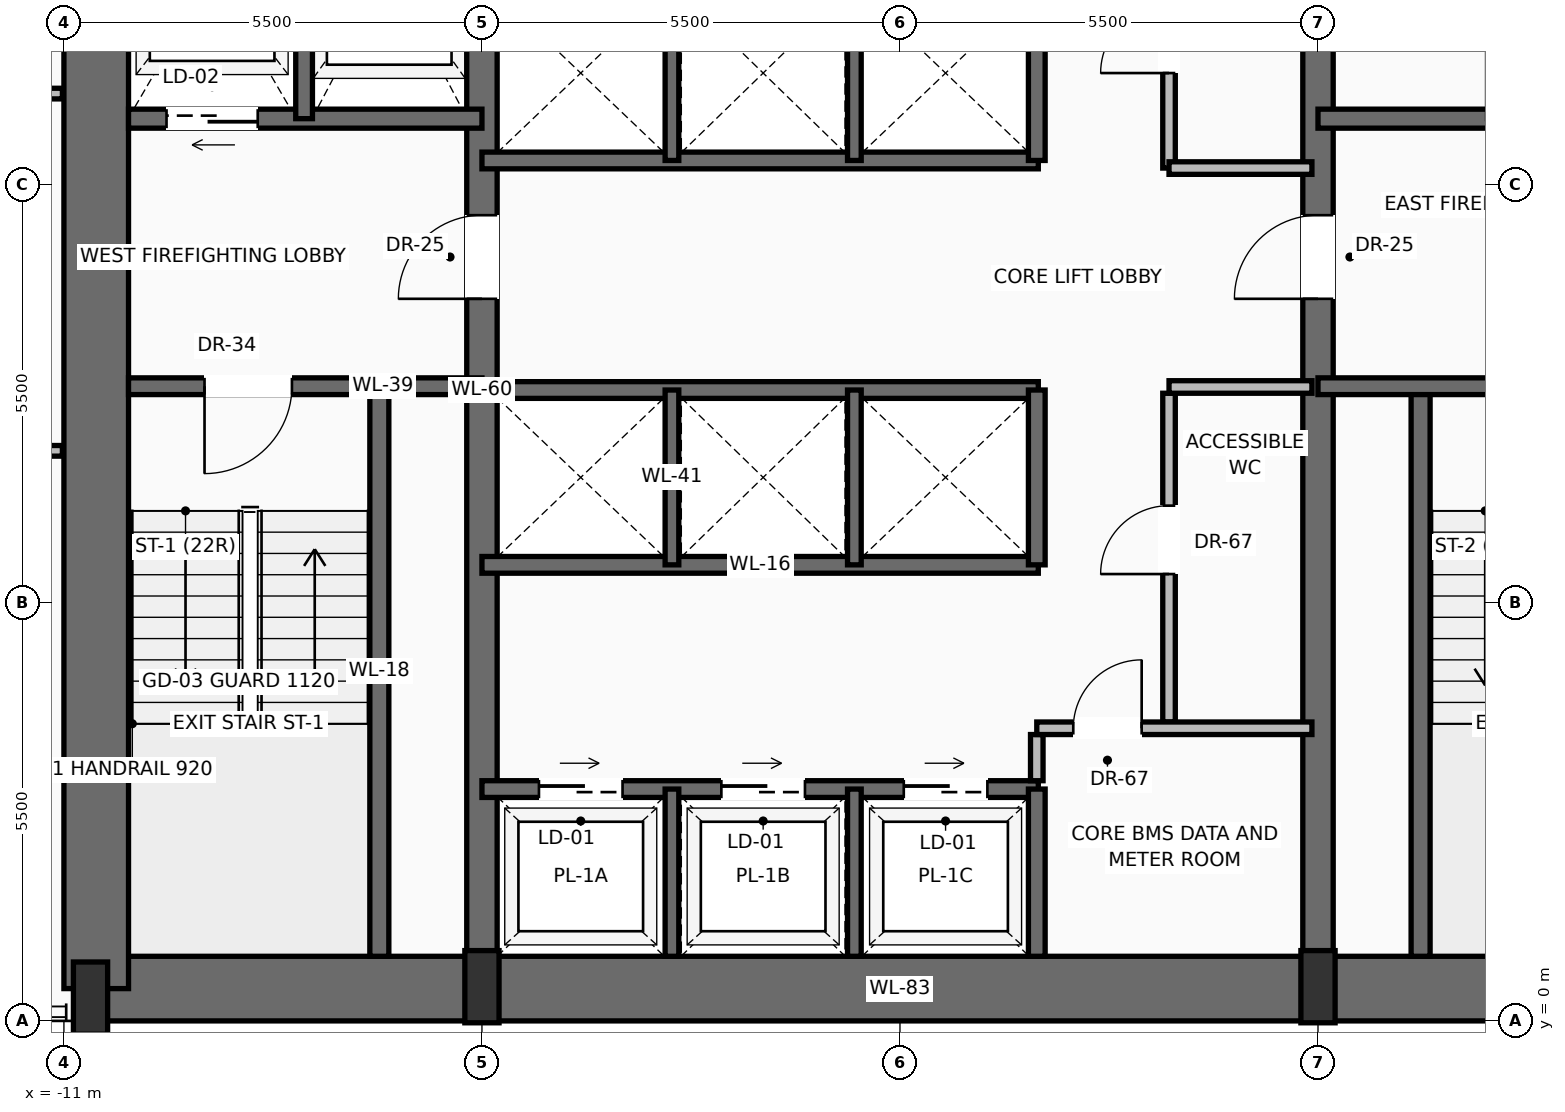
"""IFC4 building model, lengths in metres.
Left out: names, types, materials, properties, quantities, classifications, styles, units other than length and angle.
Written with IfcOpenShell. Run it as: python <this file> out.ifc"""

import sys

from ifc_helpers import new_model, si_unit, direction, frame, frame_2d, origin, origin_2d, place, context, subcontext, project, spatial, rectangle, extrude, source, transform, mapped, element, fill, save


model = new_model("IFC4")
c1 = context("Model", 3, precision=1e-05, world=origin(), true_north=direction((0.0, 1.0)))
c2 = subcontext(c1, "Body", "Model", "MODEL_VIEW")
j1 = project(units=[si_unit("LENGTHUNIT", "METRE"), si_unit("PLANEANGLEUNIT", "RADIAN")], contexts=[c1])
p1 = place(None, origin())
s1 = spatial("IfcSite", under=j1, at=p1, CompositionType="ELEMENT")
p2 = place(p1, origin())
s2 = spatial("IfcBuilding", under=s1, at=p2, CompositionType="ELEMENT")
p3 = place(p2, frame((0.0, 0.0, 42.3)))
s3 = spatial("IfcBuildingStorey", under=s2, at=p3, CompositionType="ELEMENT", Elevation=42.3)
p4 = place(p3, frame((-10.65, 0.425, 0.0), z_axis=(0.0, 0.0, 1.0), x_axis=(1.0, 0.0, 0.0)))
e1 = element("IfcWall", 1, at=p4, inside=s3, PredefinedType="SHEAR", context=c2, shape_type="SweptSolid", body=[
    extrude(rectangle(XDim=21.3, YDim=0.85, at=frame_2d((10.65, 0.0))), origin(), (0.0, 0.0, 1.0), 3.45),
])
p5 = place(p3, frame((-10.575, 0.425, 0.0), z_axis=(0.0, 0.0, 1.0), x_axis=(0.0, 1.0, 0.0)))
e2 = element("IfcWall", 2, at=p5, inside=s3, PredefinedType="SHEAR", context=c2, shape_type="SweptSolid", body=[
    extrude(rectangle(XDim=15.75, YDim=0.85, at=frame_2d((7.875, 0.0))), origin(), (0.0, 0.0, 1.0), 3.45),
])
p6 = place(p3, frame((-5.5, 0.425, 0.0), z_axis=(0.0, 0.0, 1.0), x_axis=(0.0, 1.0, 0.0)))
e3 = element("IfcWall", 3, at=p6, inside=s3, PredefinedType="SHEAR", context=c2, shape_type="SweptSolid", body=[
    extrude(rectangle(XDim=15.75, YDim=0.4, at=frame_2d((7.875, 0.0))), origin(), (0.0, 0.0, 1.0), 3.45),
])
p7 = place(p6, frame((9.075, 0.0, 0.0)))
e4 = element("IfcOpeningElement", 4, at=p7, cuts=e3, PredefinedType="OPENING", context=c2, shape_type="SweptSolid", body=[
    extrude(rectangle(XDim=1.1, YDim=2.2, at=frame_2d((0.55, 1.1))), frame((0.0, 0.21, 0.0), z_axis=(0.0, -1.0, 0.0), x_axis=(1.0, 0.0, 0.0)), (0.0, 0.0, 1.0), 0.42),
])
p8 = place(p3, frame((5.5, 0.425, 0.0), z_axis=(0.0, 0.0, 1.0), x_axis=(0.0, 1.0, 0.0)))
e5 = element("IfcWall", 5, at=p8, inside=s3, PredefinedType="SHEAR", context=c2, shape_type="SweptSolid", body=[
    extrude(rectangle(XDim=15.75, YDim=0.4, at=frame_2d((7.875, 0.0))), origin(), (0.0, 0.0, 1.0), 3.45),
])
p9 = place(p8, frame((9.075, 0.0, 0.0)))
e6 = element("IfcOpeningElement", 6, at=p9, cuts=e5, PredefinedType="OPENING", context=c2, shape_type="SweptSolid", body=[
    extrude(rectangle(XDim=1.1, YDim=2.2, at=frame_2d((0.55, 1.1))), frame((0.0, 0.21, 0.0), z_axis=(0.0, -1.0, 0.0), x_axis=(1.0, 0.0, 0.0)), (0.0, 0.0, 1.0), 0.42),
])
m1 = source(origin(), c2, "Body", "SweptSolid", [
    extrude(rectangle(XDim=0.45, YDim=0.95, at=origin_2d()), origin(), (0.0, 0.0, 1.0), 3.7),
])
for number, where, z_axis, x_axis in (
    (7, (-10.65, 0.3, 0.0), (0.0, 0.0, 1.0), (1.0, 0.0, 0.0)),
    (8, (-5.5, 0.45, 0.0), (0.0, 0.0, 1.0), (1.0, 0.0, 0.0)),
    (9, (5.5, 0.45, 0.0), (0.0, 0.0, 1.0), (1.0, 0.0, 0.0)),
):
    element("IfcColumn", number, at=place(p3, frame(where, z_axis=z_axis, x_axis=x_axis)), inside=s3, PredefinedType="PILASTER", context=c2, shape_type="MappedRepresentation", body=[
        mapped(m1, transform((0.0, 0.0, 0.0), scale=1.0)),
    ])
p10 = place(p3, frame((-6.85, 0.85, 0.0), z_axis=(0.0, 0.0, 1.0), x_axis=(0.0, 1.0, 0.0)))
e10 = element("IfcWall", 10, at=p10, inside=s3, PredefinedType="SOLIDWALL", context=c2, shape_type="SweptSolid", body=[
    extrude(rectangle(XDim=7.5, YDim=0.25, at=frame_2d((3.75, 0.0))), origin(), (0.0, 0.0, 1.0), 3.45),
])
p11 = place(p3, frame((-5.5, 8.35, 0.0), z_axis=(0.0, 0.0, 1.0), x_axis=(-1.0, 0.0, 0.0)))
e11 = element("IfcWall", 11, at=p11, inside=s3, PredefinedType="SOLIDWALL", context=c2, shape_type="SweptSolid", body=[
    extrude(rectangle(XDim=4.65, YDim=0.22, at=frame_2d((2.325, 0.0))), origin(), (0.0, 0.0, 1.0), 3.45),
])
p12 = place(p11, frame((2.5, 0.0, 0.0)))
e12 = element("IfcOpeningElement", 12, at=p12, cuts=e11, PredefinedType="OPENING", context=c2, shape_type="SweptSolid", body=[
    extrude(rectangle(XDim=1.15, YDim=2.2, at=frame_2d((0.575, 1.1))), frame((0.0, 0.12, 0.0), z_axis=(0.0, -1.0, 0.0), x_axis=(1.0, 0.0, 0.0)), (0.0, 0.0, 1.0), 0.24),
])
p13 = place(p3, frame((-5.5, 11.87, 0.0), z_axis=(0.0, 0.0, 1.0), x_axis=(-1.0, 0.0, 0.0)))
e13 = element("IfcWall", 13, at=p13, inside=s3, PredefinedType="SOLIDWALL", context=c2, shape_type="SweptSolid", body=[
    extrude(rectangle(XDim=4.65, YDim=0.25, at=frame_2d((2.325, 0.0))), origin(), (0.0, 0.0, 1.0), 3.45),
])
p14 = place(p13, frame((2.95, 0.0, 0.0)))
e14 = element("IfcOpeningElement", 14, at=p14, cuts=e13, PredefinedType="OPENING", context=c2, shape_type="SweptSolid", body=[
    extrude(rectangle(XDim=1.2, YDim=2.25, at=frame_2d((0.6, 1.125))), frame((0.0, 0.135, 0.0), z_axis=(0.0, -1.0, 0.0), x_axis=(1.0, 0.0, 0.0)), (0.0, 0.0, 1.0), 0.27),
])
p15 = place(p3, frame((-7.84, 11.87, 0.0), z_axis=(0.0, 0.0, 1.0), x_axis=(0.0, 1.0, 0.0)))
e15 = element("IfcWall", 15, at=p15, inside=s3, PredefinedType="SOLIDWALL", context=c2, shape_type="SweptSolid", body=[
    extrude(rectangle(XDim=3.88, YDim=0.22, at=frame_2d((1.94, 0.0))), origin(), (0.0, 0.0, 1.0), 3.45),
])
p16 = place(p3, frame((6.85, 0.85, 0.0), z_axis=(0.0, 0.0, 1.0), x_axis=(0.0, 1.0, 0.0)))
e16 = element("IfcWall", 16, at=p16, inside=s3, PredefinedType="SOLIDWALL", context=c2, shape_type="SweptSolid", body=[
    extrude(rectangle(XDim=7.5, YDim=0.25, at=frame_2d((3.75, 0.0))), origin(), (0.0, 0.0, 1.0), 3.45),
])
p17 = place(p3, frame((10.15, 8.35, 0.0), z_axis=(0.0, 0.0, 1.0), x_axis=(-1.0, 0.0, 0.0)))
e17 = element("IfcWall", 17, at=p17, inside=s3, PredefinedType="SOLIDWALL", context=c2, shape_type="SweptSolid", body=[
    extrude(rectangle(XDim=4.65, YDim=0.22, at=frame_2d((2.325, 0.0))), origin(), (0.0, 0.0, 1.0), 3.45),
])
p18 = place(p17, frame((1.0, 0.0, 0.0)))
e18 = element("IfcOpeningElement", 18, at=p18, cuts=e17, PredefinedType="OPENING", context=c2, shape_type="SweptSolid", body=[
    extrude(rectangle(XDim=1.15, YDim=2.2, at=frame_2d((0.575, 1.1))), frame((0.0, 0.12, 0.0), z_axis=(0.0, -1.0, 0.0), x_axis=(1.0, 0.0, 0.0)), (0.0, 0.0, 1.0), 0.24),
])
p19 = place(p3, frame((10.15, 11.87, 0.0), z_axis=(0.0, 0.0, 1.0), x_axis=(-1.0, 0.0, 0.0)))
e19 = element("IfcWall", 19, at=p19, inside=s3, PredefinedType="SOLIDWALL", context=c2, shape_type="SweptSolid", body=[
    extrude(rectangle(XDim=4.65, YDim=0.25, at=frame_2d((2.325, 0.0))), origin(), (0.0, 0.0, 1.0), 3.45),
])
p20 = place(p19, frame((0.5, 0.0, 0.0)))
e20 = element("IfcOpeningElement", 20, at=p20, cuts=e19, PredefinedType="OPENING", context=c2, shape_type="SweptSolid", body=[
    extrude(rectangle(XDim=1.2, YDim=2.25, at=frame_2d((0.6, 1.125))), frame((0.0, 0.135, 0.0), z_axis=(0.0, -1.0, 0.0), x_axis=(1.0, 0.0, 0.0)), (0.0, 0.0, 1.0), 0.27),
])
p21 = place(p3, frame((-5.5, 3.05, 0.0), z_axis=(0.0, 0.0, 1.0), x_axis=(1.0, 0.0, 0.0)))
e21 = element("IfcWall", 21, at=p21, inside=s3, PredefinedType="SOLIDWALL", context=c2, shape_type="SweptSolid", body=[
    extrude(rectangle(XDim=7.32, YDim=0.22, at=frame_2d((3.66, 0.0))), origin(), (0.0, 0.0, 1.0), 3.45),
])
p22 = place(p21, frame((0.75, 0.0, 0.0)))
e22 = element("IfcOpeningElement", 22, at=p22, cuts=e21, PredefinedType="OPENING", context=c2, shape_type="SweptSolid", body=[
    extrude(rectangle(XDim=1.1, YDim=2.2, at=frame_2d((0.55, 1.1))), frame((0.0, 0.12, 0.0), z_axis=(0.0, -1.0, 0.0), x_axis=(1.0, 0.0, 0.0)), (0.0, 0.0, 1.0), 0.24),
])
p23 = place(p21, frame((3.15, 0.0, 0.0)))
e23 = element("IfcOpeningElement", 23, at=p23, cuts=e21, PredefinedType="OPENING", context=c2, shape_type="SweptSolid", body=[
    extrude(rectangle(XDim=1.1, YDim=2.2, at=frame_2d((0.55, 1.1))), frame((0.0, 0.12, 0.0), z_axis=(0.0, -1.0, 0.0), x_axis=(1.0, 0.0, 0.0)), (0.0, 0.0, 1.0), 0.24),
])
p24 = place(p21, frame((5.55, 0.0, 0.0)))
e24 = element("IfcOpeningElement", 24, at=p24, cuts=e21, PredefinedType="OPENING", context=c2, shape_type="SweptSolid", body=[
    extrude(rectangle(XDim=1.1, YDim=2.2, at=frame_2d((0.55, 1.1))), frame((0.0, 0.12, 0.0), z_axis=(0.0, -1.0, 0.0), x_axis=(1.0, 0.0, 0.0)), (0.0, 0.0, 1.0), 0.24),
])
p25 = place(p3, frame((1.8, 0.85, 0.0), z_axis=(0.0, 0.0, 1.0), x_axis=(0.0, 1.0, 0.0)))
e25 = element("IfcWall", 25, at=p25, inside=s3, PredefinedType="SOLIDWALL", context=c2, shape_type="SweptSolid", body=[
    extrude(rectangle(XDim=2.2, YDim=0.22, at=frame_2d((1.1, 0.0))), origin(), (0.0, 0.0, 1.0), 3.45),
])
for number, where, z_axis, x_axis in (
    (26, (-3.0, 0.85, 0.0), (0.0, 0.0, 1.0), (0.0, 1.0, 0.0)),
    (27, (-0.6, 0.85, 0.0), (0.0, 0.0, 1.0), (0.0, 1.0, 0.0)),
):
    element("IfcWall", number, at=place(p3, frame(where, z_axis=z_axis, x_axis=x_axis)), inside=s3, PredefinedType="SOLIDWALL", context=c2, shape_type="SweptSolid", body=[
        extrude(rectangle(XDim=2.2, YDim=0.18, at=frame_2d((1.1, 0.0))), origin(), (0.0, 0.0, 1.0), 3.45),
    ])
p26 = place(p3, frame((1.8, 3.16, 0.0), z_axis=(0.0, 0.0, 1.0), x_axis=(0.0, 1.0, 0.0)))
e28 = element("IfcWall", 28, at=p26, inside=s3, PredefinedType="PARTITIONING", context=c2, shape_type="SweptSolid", body=[
    extrude(rectangle(XDim=0.608, YDim=0.165, at=frame_2d((0.304, 0.0))), origin(), (0.0, 0.0, 1.0), 3.442),
])
p27 = place(p3, frame((3.54, 3.933, 0.0), z_axis=(0.0, 0.0, 1.0), x_axis=(0.0, 1.0, 0.0)))
e29 = element("IfcWall", 29, at=p27, inside=s3, PredefinedType="PARTITIONING", context=c2, shape_type="SweptSolid", body=[
    extrude(rectangle(XDim=4.325, YDim=0.165, at=frame_2d((2.163, 0.0))), origin(), (0.0, 0.0, 1.0), 3.442),
])
p28 = place(p27, frame((1.946, 0.0, 0.0)))
e30 = element("IfcOpeningElement", 30, at=p28, cuts=e29, PredefinedType="OPENING", context=c2, shape_type="SweptSolid", body=[
    extrude(rectangle(XDim=0.9, YDim=2.1, at=frame_2d((0.45, 1.05))), frame((0.0, 0.093, 0.0), z_axis=(0.0, -1.0, 0.0), x_axis=(1.0, 0.0, 0.0)), (0.0, 0.0, 1.0), 0.185),
])
p29 = place(p3, frame((3.54, 8.34, 0.0), z_axis=(0.0, 0.0, 1.0), x_axis=(1.0, 0.0, 0.0)))
e31 = element("IfcWall", 31, at=p29, inside=s3, PredefinedType="PARTITIONING", context=c2, shape_type="SweptSolid", body=[
    extrude(rectangle(XDim=1.88, YDim=0.165, at=frame_2d((0.94, 0.0))), origin(), (0.0, 0.0, 1.0), 3.442),
])
p30 = place(p3, frame((1.8, 3.85, 0.0), z_axis=(0.0, 0.0, 1.0), x_axis=(1.0, 0.0, 0.0)))
e32 = element("IfcWall", 32, at=p30, inside=s3, PredefinedType="PARTITIONING", context=c2, shape_type="SweptSolid", body=[
    extrude(rectangle(XDim=3.62, YDim=0.165, at=frame_2d((1.81, 0.0))), origin(), (0.0, 0.0, 1.0), 3.442),
])
p31 = place(p30, frame((0.48, 0.0, 0.0)))
e33 = element("IfcOpeningElement", 33, at=p31, cuts=e32, PredefinedType="OPENING", context=c2, shape_type="SweptSolid", body=[
    extrude(rectangle(XDim=0.9, YDim=2.1, at=frame_2d((0.45, 1.05))), frame((0.0, 0.093, 0.0), z_axis=(0.0, -1.0, 0.0), x_axis=(1.0, 0.0, 0.0)), (0.0, 0.0, 1.0), 0.185),
])
for number, where, z_axis, x_axis in (
    (34, (-5.5, 6.0, 0.0), (0.0, 0.0, 1.0), (1.0, 0.0, 0.0)),
    (35, (-5.5, 8.3, 0.0), (0.0, 0.0, 1.0), (1.0, 0.0, 0.0)),
):
    element("IfcWall", number, at=place(p3, frame(where, z_axis=z_axis, x_axis=x_axis)), inside=s3, PredefinedType="SOLIDWALL", context=c2, shape_type="SweptSolid", body=[
        extrude(rectangle(XDim=7.32, YDim=0.22, at=frame_2d((3.66, 0.0))), origin(), (0.0, 0.0, 1.0), 3.45),
    ])
p32 = place(p3, frame((1.8, 6.0, 0.0), z_axis=(0.0, 0.0, 1.0), x_axis=(0.0, 1.0, 0.0)))
e36 = element("IfcWall", 36, at=p32, inside=s3, PredefinedType="SOLIDWALL", context=c2, shape_type="SweptSolid", body=[
    extrude(rectangle(XDim=2.3, YDim=0.22, at=frame_2d((1.15, 0.0))), origin(), (0.0, 0.0, 1.0), 3.45),
])
for number, where, z_axis, x_axis in (
    (37, (-3.0, 6.0, 0.0), (0.0, 0.0, 1.0), (0.0, 1.0, 0.0)),
    (38, (-0.6, 6.0, 0.0), (0.0, 0.0, 1.0), (0.0, 1.0, 0.0)),
):
    element("IfcWall", number, at=place(p3, frame(where, z_axis=z_axis, x_axis=x_axis)), inside=s3, PredefinedType="SOLIDWALL", context=c2, shape_type="SweptSolid", body=[
        extrude(rectangle(XDim=2.3, YDim=0.18, at=frame_2d((1.15, 0.0))), origin(), (0.0, 0.0, 1.0), 3.45),
    ])
p33 = place(p3, frame((-5.5, 11.32, 0.0), z_axis=(0.0, 0.0, 1.0), x_axis=(1.0, 0.0, 0.0)))
e39 = element("IfcWall", 39, at=p33, inside=s3, PredefinedType="SOLIDWALL", context=c2, shape_type="SweptSolid", body=[
    extrude(rectangle(XDim=7.32, YDim=0.22, at=frame_2d((3.66, 0.0))), origin(), (0.0, 0.0, 1.0), 3.45),
])
p34 = place(p3, frame((1.8, 11.32, 0.0), z_axis=(0.0, 0.0, 1.0), x_axis=(0.0, 1.0, 0.0)))
e40 = element("IfcWall", 40, at=p34, inside=s3, PredefinedType="SOLIDWALL", context=c2, shape_type="SweptSolid", body=[
    extrude(rectangle(XDim=2.3, YDim=0.22, at=frame_2d((1.15, 0.0))), origin(), (0.0, 0.0, 1.0), 3.45),
])
for number, where, z_axis, x_axis in (
    (41, (-3.0, 11.32, 0.0), (0.0, 0.0, 1.0), (0.0, 1.0, 0.0)),
    (42, (-0.6, 11.32, 0.0), (0.0, 0.0, 1.0), (0.0, 1.0, 0.0)),
):
    element("IfcWall", number, at=place(p3, frame(where, z_axis=z_axis, x_axis=x_axis)), inside=s3, PredefinedType="SOLIDWALL", context=c2, shape_type="SweptSolid", body=[
        extrude(rectangle(XDim=2.3, YDim=0.18, at=frame_2d((1.15, 0.0))), origin(), (0.0, 0.0, 1.0), 3.45),
    ])
p35 = place(p3, frame((3.54, 11.22, 0.0), z_axis=(0.0, 0.0, 1.0), x_axis=(0.0, 1.0, 0.0)))
e43 = element("IfcWall", 43, at=p35, inside=s3, PredefinedType="PARTITIONING", context=c2, shape_type="SweptSolid", body=[
    extrude(rectangle(XDim=4.53, YDim=0.165, at=frame_2d((2.265, 0.0))), origin(), (0.0, 0.0, 1.0), 3.442),
])
p36 = place(p35, frame((1.25, 0.0, 0.0)))
e44 = element("IfcOpeningElement", 44, at=p36, cuts=e43, PredefinedType="OPENING", context=c2, shape_type="SweptSolid", body=[
    extrude(rectangle(XDim=0.9, YDim=2.1, at=frame_2d((0.45, 1.05))), frame((0.0, 0.093, 0.0), z_axis=(0.0, -1.0, 0.0), x_axis=(1.0, 0.0, 0.0)), (0.0, 0.0, 1.0), 0.185),
])
p37 = place(p3, frame((3.54, 11.22, 0.0), z_axis=(0.0, 0.0, 1.0), x_axis=(1.0, 0.0, 0.0)))
e45 = element("IfcWall", 45, at=p37, inside=s3, PredefinedType="PARTITIONING", context=c2, shape_type="SweptSolid", body=[
    extrude(rectangle(XDim=1.88, YDim=0.165, at=frame_2d((0.94, 0.0))), origin(), (0.0, 0.0, 1.0), 3.442),
])
p38 = place(p3, frame((-26.458, 7.5, 0.0), z_axis=(0.0, 0.0, 1.0), x_axis=(1.0, 0.0, 0.0)))
e46 = element("IfcWall", 46, at=p38, inside=s3, PredefinedType="PARTITIONING", context=c2, shape_type="SweptSolid", body=[
    extrude(rectangle(XDim=15.438, YDim=0.14, at=frame_2d((7.719, 0.0))), origin(), (0.0, 0.0, 1.0), 2.979),
])
p39 = place(p38, frame((7.256, 0.0, 0.0)))
e47 = element("IfcOpeningElement", 47, at=p39, cuts=e46, PredefinedType="OPENING", context=c2, shape_type="SweptSolid", body=[
    extrude(rectangle(XDim=0.95, YDim=2.2, at=frame_2d((0.475, 1.1))), frame((0.0, 0.08, 0.0), z_axis=(0.0, -1.0, 0.0), x_axis=(1.0, 0.0, 0.0)), (0.0, 0.0, 1.0), 0.16),
])
p40 = place(p3, frame((-27.625, 12.2, 0.0), z_axis=(0.0, 0.0, 1.0), x_axis=(1.0, 0.0, 0.0)))
e48 = element("IfcWall", 48, at=p40, inside=s3, PredefinedType="PARTITIONING", context=c2, shape_type="SweptSolid", body=[
    extrude(rectangle(XDim=16.605, YDim=0.14, at=frame_2d((8.303, 0.0))), origin(), (0.0, 0.0, 1.0), 3.442),
])
p41 = place(p40, frame((7.841, 0.0, 0.0)))
e49 = element("IfcOpeningElement", 49, at=p41, cuts=e48, PredefinedType="OPENING", context=c2, shape_type="SweptSolid", body=[
    extrude(rectangle(XDim=0.95, YDim=2.2, at=frame_2d((0.475, 1.1))), frame((0.0, 0.08, 0.0), z_axis=(0.0, -1.0, 0.0), x_axis=(1.0, 0.0, 0.0)), (0.0, 0.0, 1.0), 0.16),
])
m2 = source(origin(), c2, "Body", "SweptSolid", [
    extrude(rectangle(XDim=1.15, YDim=2.2, at=frame_2d((0.575, 1.1))), frame((0.0, 0.025, 0.0), z_axis=(0.0, -1.0, 0.0), x_axis=(1.0, 0.0, 0.0)), (0.0, 0.0, 1.0), 0.05),
])
p42 = place(p12, origin())
e50 = element("IfcDoor", 50, at=p42, inside=s3, OperationType="SINGLE_SWING_RIGHT", PredefinedType="DOOR", context=c2, shape_type="MappedRepresentation", body=[
    mapped(m2, transform((0.0, 0.0, 0.0), scale=1.0)),
])
fill(e12, e50)
m3 = source(origin(), c2, "Body", "SweptSolid", [
    extrude(rectangle(XDim=1.1, YDim=2.2, at=frame_2d((0.55, 1.1))), frame((0.0, 0.025, 0.0), z_axis=(0.0, -1.0, 0.0), x_axis=(1.0, 0.0, 0.0)), (0.0, 0.0, 1.0), 0.05),
])
p43 = place(p7, origin())
e51 = element("IfcDoor", 51, at=p43, inside=s3, OperationType="SINGLE_SWING_LEFT", PredefinedType="DOOR", context=c2, shape_type="MappedRepresentation", body=[
    mapped(m3, transform((0.0, 0.0, 0.0), scale=1.0)),
])
fill(e4, e51)
m4 = source(origin(), c2, "Body", "SweptSolid", [
    extrude(rectangle(XDim=1.2, YDim=2.25, at=frame_2d((0.6, 1.125))), frame((0.0, 0.025, 0.0), z_axis=(0.0, -1.0, 0.0), x_axis=(1.0, 0.0, 0.0)), (0.0, 0.0, 1.0), 0.05),
])
p44 = place(p14, origin())
e52 = element("IfcDoor", 52, at=p44, inside=s3, OperationType="SLIDING_TO_LEFT", PredefinedType="DOOR", context=c2, shape_type="MappedRepresentation", body=[
    mapped(m4, transform((0.0, 0.0, 0.0), scale=1.0)),
])
fill(e14, e52)
p45 = place(p9, origin())
e53 = element("IfcDoor", 53, at=p45, inside=s3, OperationType="SINGLE_SWING_LEFT", PredefinedType="DOOR", context=c2, shape_type="MappedRepresentation", body=[
    mapped(m3, transform((0.0, 0.0, 0.0), scale=1.0)),
])
fill(e6, e53)
m5 = source(origin(), c2, "Body", "SweptSolid", [
    extrude(rectangle(XDim=1.1, YDim=2.2, at=frame_2d((0.55, 1.1))), frame((0.0, 0.025, 0.0), z_axis=(0.0, -1.0, 0.0), x_axis=(1.0, 0.0, 0.0)), (0.0, 0.0, 1.0), 0.05),
])
p46 = place(p22, origin())
e54 = element("IfcDoor", 54, at=p46, inside=s3, OperationType="SLIDING_TO_RIGHT", PredefinedType="DOOR", context=c2, shape_type="MappedRepresentation", body=[
    mapped(m5, transform((0.0, 0.0, 0.0), scale=1.0)),
])
fill(e22, e54)
p47 = place(p23, origin())
e55 = element("IfcDoor", 55, at=p47, inside=s3, OperationType="SLIDING_TO_RIGHT", PredefinedType="DOOR", context=c2, shape_type="MappedRepresentation", body=[
    mapped(m5, transform((0.0, 0.0, 0.0), scale=1.0)),
])
fill(e23, e55)
p48 = place(p24, origin())
e56 = element("IfcDoor", 56, at=p48, inside=s3, OperationType="SLIDING_TO_RIGHT", PredefinedType="DOOR", context=c2, shape_type="MappedRepresentation", body=[
    mapped(m5, transform((0.0, 0.0, 0.0), scale=1.0)),
])
fill(e24, e56)
m6 = source(origin(), c2, "Body", "SweptSolid", [
    extrude(rectangle(XDim=0.9, YDim=2.1, at=frame_2d((0.45, 1.05))), frame((0.0, 0.025, 0.0), z_axis=(0.0, -1.0, 0.0), x_axis=(1.0, 0.0, 0.0)), (0.0, 0.0, 1.0), 0.05),
])
p49 = place(p31, origin())
e57 = element("IfcDoor", 57, at=p49, inside=s3, OperationType="SINGLE_SWING_RIGHT", PredefinedType="DOOR", context=c2, shape_type="MappedRepresentation", body=[
    mapped(m6, transform((0.0, 0.0, 0.0), scale=1.0)),
])
fill(e33, e57)
p50 = place(p28, origin())
e58 = element("IfcDoor", 58, at=p50, inside=s3, OperationType="SINGLE_SWING_LEFT", PredefinedType="DOOR", context=c2, shape_type="MappedRepresentation", body=[
    mapped(m6, transform((0.0, 0.0, 0.0), scale=1.0)),
])
fill(e30, e58)
p51 = place(p36, origin())
e59 = element("IfcDoor", 59, at=p51, inside=s3, OperationType="SINGLE_SWING_LEFT", PredefinedType="DOOR", context=c2, shape_type="MappedRepresentation", body=[
    mapped(m6, transform((0.0, 0.0, 0.0), scale=1.0)),
])
fill(e44, e59)
save(model, sys.argv[1])
